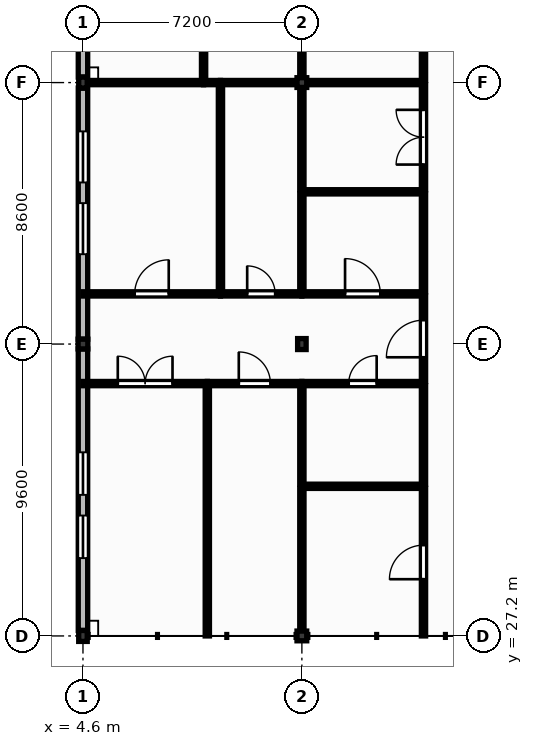
"""IFC4 building model, lengths in metres.
Left out: names, types, materials, properties, quantities, classifications, styles, units other than length and angle.
Written with IfcOpenShell. Run it as: python <this file> out.ifc"""

import sys

from ifc_helpers import new_model, si_unit, direction, frame, frame_2d, origin, origin_2d, place, context, subcontext, project, spatial, rectangle, extrude, element, fill, save


model = new_model("IFC4")
c1 = context("Model", 3, precision=1e-05, world=origin(), true_north=direction((0.0, 1.0)))
c2 = subcontext(c1, "Body", "Model", "MODEL_VIEW")
j1 = project(units=[si_unit("LENGTHUNIT", "METRE"), si_unit("PLANEANGLEUNIT", "RADIAN")], contexts=[c1])
p1 = place(None, origin())
s1 = spatial("IfcSite", under=j1, at=p1, CompositionType="ELEMENT")
p2 = place(p1, origin())
s2 = spatial("IfcBuilding", under=s1, at=p2, CompositionType="ELEMENT")
p3 = place(p2, frame((0.0, 0.0, 9.0)))
s3 = spatial("IfcBuildingStorey", under=s2, at=p3, CompositionType="ELEMENT", Elevation=9.0)
p4 = place(p3, frame((4.6, 27.2, 0.0), z_axis=(0.0, 0.0, 1.0), x_axis=(1.0, 0.0, 0.0)))
e1 = element("IfcColumn", 1, at=p4, inside=s3, PredefinedType="COLUMN", context=c2, shape_type="SweptSolid", body=[
    extrude(rectangle(XDim=0.28, YDim=0.36, at=origin_2d()), origin(), (0.0, 0.0, 1.0), 3.99),
])
p5 = place(p3, frame((4.6, 36.8, 0.0), z_axis=(0.0, 0.0, 1.0), x_axis=(1.0, 0.0, 0.0)))
e2 = element("IfcColumn", 2, at=p5, inside=s3, PredefinedType="COLUMN", context=c2, shape_type="SweptSolid", body=[
    extrude(rectangle(XDim=0.32, YDim=0.32, at=origin_2d()), origin(), (0.0, 0.0, 1.0), 3.99),
])
p6 = place(p3, frame((4.6, 45.4, 0.0), z_axis=(0.0, 0.0, 1.0), x_axis=(1.0, 0.0, 0.0)))
e3 = element("IfcColumn", 3, at=p6, inside=s3, PredefinedType="COLUMN", context=c2, shape_type="SweptSolid", body=[
    extrude(rectangle(XDim=0.28, YDim=0.36, at=origin_2d()), origin(), (0.0, 0.0, 1.0), 3.99),
])
p7 = place(p3, frame((11.8, 27.2, 0.0), z_axis=(0.0, 0.0, 1.0), x_axis=(1.0, 0.0, 0.0)))
e4 = element("IfcColumn", 4, at=p7, inside=s3, PredefinedType="COLUMN", context=c2, shape_type="SweptSolid", body=[
    extrude(rectangle(XDim=0.32, YDim=0.32, at=origin_2d()), origin(), (0.0, 0.0, 1.0), 3.99),
])
p8 = place(p3, frame((11.8, 36.8, 0.0), z_axis=(0.0, 0.0, 1.0), x_axis=(1.0, 0.0, 0.0)))
e5 = element("IfcColumn", 5, at=p8, inside=s3, PredefinedType="COLUMN", context=c2, shape_type="SweptSolid", body=[
    extrude(rectangle(XDim=0.28, YDim=0.36, at=origin_2d()), origin(), (0.0, 0.0, 1.0), 3.99),
])
p9 = place(p3, frame((11.8, 45.4, 0.0), z_axis=(0.0, 0.0, 1.0), x_axis=(1.0, 0.0, 0.0)))
e6 = element("IfcColumn", 6, at=p9, inside=s3, PredefinedType="COLUMN", context=c2, shape_type="SweptSolid", body=[
    extrude(rectangle(XDim=0.32, YDim=0.32, at=origin_2d()), origin(), (0.0, 0.0, 1.0), 3.99),
])
p10 = place(p3, frame((4.6, 27.38, 0.0), z_axis=(0.0, 0.0, 1.0), x_axis=(0.0, 1.0, 0.0)))
e7 = element("IfcWall", 7, at=p10, inside=s3, PredefinedType="SOLIDWALL", context=c2, shape_type="SweptSolid", body=[
    extrude(rectangle(XDim=9.26, YDim=0.31, at=frame_2d((4.63, 0.0))), origin(), (0.0, 0.0, 1.0), 3.53),
])
p11 = place(p10, frame((2.38, 0.0, 1.05)))
e8 = element("IfcOpeningElement", 8, at=p11, cuts=e7, PredefinedType="OPENING", context=c2, shape_type="SweptSolid", body=[
    extrude(rectangle(XDim=1.4, YDim=1.65, at=frame_2d((0.7, 0.825))), frame((0.0, 0.165, 0.0), z_axis=(0.0, -1.0, 0.0), x_axis=(1.0, 0.0, 0.0)), (0.0, 0.0, 1.0), 0.33),
])
p12 = place(p10, frame((4.46, 0.0, 1.05)))
e9 = element("IfcOpeningElement", 9, at=p12, cuts=e7, PredefinedType="OPENING", context=c2, shape_type="SweptSolid", body=[
    extrude(rectangle(XDim=1.4, YDim=1.65, at=frame_2d((0.7, 0.825))), frame((0.0, 0.165, 0.0), z_axis=(0.0, -1.0, 0.0), x_axis=(1.0, 0.0, 0.0)), (0.0, 0.0, 1.0), 0.33),
])
p13 = place(p3, frame((4.6, 36.96, 0.0), z_axis=(0.0, 0.0, 1.0), x_axis=(0.0, 1.0, 0.0)))
e10 = element("IfcWall", 10, at=p13, inside=s3, PredefinedType="SOLIDWALL", context=c2, shape_type="SweptSolid", body=[
    extrude(rectangle(XDim=8.26, YDim=0.31, at=frame_2d((4.13, 0.0))), origin(), (0.0, 0.0, 1.0), 3.53),
])
p14 = place(p13, frame((2.795, 0.0, 1.05)))
e11 = element("IfcOpeningElement", 11, at=p14, cuts=e10, PredefinedType="OPENING", context=c2, shape_type="SweptSolid", body=[
    extrude(rectangle(XDim=1.68, YDim=1.65, at=frame_2d((0.84, 0.825))), frame((0.0, 0.165, 0.0), z_axis=(0.0, -1.0, 0.0), x_axis=(1.0, 0.0, 0.0)), (0.0, 0.0, 1.0), 0.33),
])
p15 = place(p13, frame((5.155, 0.0, 1.05)))
e12 = element("IfcOpeningElement", 12, at=p15, cuts=e10, PredefinedType="OPENING", context=c2, shape_type="SweptSolid", body=[
    extrude(rectangle(XDim=1.68, YDim=1.65, at=frame_2d((0.84, 0.825))), frame((0.0, 0.165, 0.0), z_axis=(0.0, -1.0, 0.0), x_axis=(1.0, 0.0, 0.0)), (0.0, 0.0, 1.0), 0.33),
])
p16 = place(p3, frame((4.6, 45.58, 0.0), z_axis=(0.0, 0.0, 1.0), x_axis=(0.0, 1.0, 0.0)))
e13 = element("IfcWall", 13, at=p16, inside=s3, PredefinedType="SOLIDWALL", context=c2, shape_type="SweptSolid", body=[
    extrude(rectangle(XDim=6.86, YDim=0.31, at=frame_2d((3.43, 0.0))), origin(), (0.0, 0.0, 1.0), 3.53),
])
p17 = place(p16, frame((1.59, 0.0, 1.05)))
e14 = element("IfcOpeningElement", 14, at=p17, cuts=e13, PredefinedType="OPENING", context=c2, shape_type="SweptSolid", body=[
    extrude(rectangle(XDim=1.96, YDim=1.65, at=frame_2d((0.98, 0.825))), frame((0.0, 0.165, 0.0), z_axis=(0.0, -1.0, 0.0), x_axis=(1.0, 0.0, 0.0)), (0.0, 0.0, 1.0), 0.33),
])
p18 = place(p3, frame((4.6, 35.5, 0.0), z_axis=(0.0, 0.0, 1.0), x_axis=(1.0, 0.0, 0.0)))
e15 = element("IfcWall", 15, at=p18, inside=s3, PredefinedType="PARTITIONING", context=c2, shape_type="SweptSolid", body=[
    extrude(rectangle(XDim=4.09, YDim=0.14, at=frame_2d((2.045, 0.0))), origin(), (0.0, 0.0, 1.0), 3.96),
])
p19 = place(p18, frame((1.145, 0.0, 0.0)))
e16 = element("IfcOpeningElement", 16, at=p19, cuts=e15, PredefinedType="OPENING", context=c2, shape_type="SweptSolid", body=[
    extrude(rectangle(XDim=1.8, YDim=2.3, at=frame_2d((0.9, 1.15))), frame((0.0, 0.08, 0.0), z_axis=(0.0, -1.0, 0.0), x_axis=(1.0, 0.0, 0.0)), (0.0, 0.0, 1.0), 0.16),
])
p20 = place(p3, frame((4.6, 38.45, 0.0), z_axis=(0.0, 0.0, 1.0), x_axis=(1.0, 0.0, 0.0)))
e17 = element("IfcWall", 17, at=p20, inside=s3, PredefinedType="PARTITIONING", context=c2, shape_type="SweptSolid", body=[
    extrude(rectangle(XDim=4.522, YDim=0.14, at=frame_2d((2.261, 0.0))), origin(), (0.0, 0.0, 1.0), 3.96),
])
p21 = place(p20, frame((1.701, 0.0, 0.0)))
e18 = element("IfcOpeningElement", 18, at=p21, cuts=e17, PredefinedType="OPENING", context=c2, shape_type="SweptSolid", body=[
    extrude(rectangle(XDim=1.12, YDim=2.15, at=frame_2d((0.56, 1.075))), frame((0.0, 0.08, 0.0), z_axis=(0.0, -1.0, 0.0), x_axis=(1.0, 0.0, 0.0)), (0.0, 0.0, 1.0), 0.16),
])
p22 = place(p3, frame((4.74, 45.4, 0.0), z_axis=(0.0, 0.0, 1.0), x_axis=(1.0, 0.0, 0.0)))
e19 = element("IfcWall", 19, at=p22, inside=s3, PredefinedType="PARTITIONING", context=c2, shape_type="SweptSolid", body=[
    extrude(rectangle(XDim=3.827, YDim=0.14, at=frame_2d((1.914, 0.0))), origin(), (0.0, 0.0, 1.0), 3.39),
])
p23 = place(p3, frame((8.567, 45.47, 0.0), z_axis=(0.0, 0.0, 1.0), x_axis=(0.0, 1.0, 0.0)))
e20 = element("IfcWall", 20, at=p23, inside=s3, PredefinedType="PARTITIONING", context=c2, shape_type="SweptSolid", body=[
    extrude(rectangle(XDim=5.06, YDim=0.14, at=frame_2d((2.53, 0.0))), origin(), (0.0, 0.0, 1.0), 3.96),
])
p24 = place(p3, frame((8.567, 45.4, 0.0), z_axis=(0.0, 0.0, 1.0), x_axis=(1.0, 0.0, 0.0)))
e21 = element("IfcWall", 21, at=p24, inside=s3, PredefinedType="PARTITIONING", context=c2, shape_type="SweptSolid", body=[
    extrude(rectangle(XDim=0.555, YDim=0.14, at=frame_2d((0.278, 0.0))), origin(), (0.0, 0.0, 1.0), 3.39),
])
p25 = place(p3, frame((8.69, 27.2, 0.0), z_axis=(0.0, 0.0, 1.0), x_axis=(0.0, 1.0, 0.0)))
e22 = element("IfcWall", 22, at=p25, inside=s3, PredefinedType="PARTITIONING", context=c2, shape_type="SweptSolid", body=[
    extrude(rectangle(XDim=8.23, YDim=0.14, at=frame_2d((4.115, 0.0))), origin(), (0.0, 0.0, 1.0), 3.96),
])
p26 = place(p3, frame((8.69, 35.5, 0.0), z_axis=(0.0, 0.0, 1.0), x_axis=(1.0, 0.0, 0.0)))
e23 = element("IfcWall", 23, at=p26, inside=s3, PredefinedType="PARTITIONING", context=c2, shape_type="SweptSolid", body=[
    extrude(rectangle(XDim=3.11, YDim=0.14, at=frame_2d((1.555, 0.0))), origin(), (0.0, 0.0, 1.0), 3.96),
])
p27 = place(p26, frame((1.035, 0.0, 0.0)))
e24 = element("IfcOpeningElement", 24, at=p27, cuts=e23, PredefinedType="OPENING", context=c2, shape_type="SweptSolid", body=[
    extrude(rectangle(XDim=1.04, YDim=2.1, at=frame_2d((0.52, 1.05))), frame((0.0, 0.08, 0.0), z_axis=(0.0, -1.0, 0.0), x_axis=(1.0, 0.0, 0.0)), (0.0, 0.0, 1.0), 0.16),
])
p28 = place(p3, frame((9.122, 38.52, 0.0), z_axis=(0.0, 0.0, 1.0), x_axis=(0.0, 1.0, 0.0)))
e25 = element("IfcWall", 25, at=p28, inside=s3, PredefinedType="PARTITIONING", context=c2, shape_type="SweptSolid", body=[
    extrude(rectangle(XDim=6.81, YDim=0.14, at=frame_2d((3.405, 0.0))), origin(), (0.0, 0.0, 1.0), 3.96),
])
p29 = place(p3, frame((9.122, 38.45, 0.0), z_axis=(0.0, 0.0, 1.0), x_axis=(1.0, 0.0, 0.0)))
e26 = element("IfcWall", 26, at=p29, inside=s3, PredefinedType="PARTITIONING", context=c2, shape_type="SweptSolid", body=[
    extrude(rectangle(XDim=2.678, YDim=0.14, at=frame_2d((1.339, 0.0))), origin(), (0.0, 0.0, 1.0), 3.96),
])
p30 = place(p29, frame((0.879, 0.0, 0.0)))
e27 = element("IfcOpeningElement", 27, at=p30, cuts=e26, PredefinedType="OPENING", context=c2, shape_type="SweptSolid", body=[
    extrude(rectangle(XDim=0.92, YDim=2.1, at=frame_2d((0.46, 1.05))), frame((0.0, 0.08, 0.0), z_axis=(0.0, -1.0, 0.0), x_axis=(1.0, 0.0, 0.0)), (0.0, 0.0, 1.0), 0.16),
])
p31 = place(p3, frame((9.122, 45.4, 0.0), z_axis=(0.0, 0.0, 1.0), x_axis=(1.0, 0.0, 0.0)))
e28 = element("IfcWall", 28, at=p31, inside=s3, PredefinedType="PARTITIONING", context=c2, shape_type="SweptSolid", body=[
    extrude(rectangle(XDim=2.518, YDim=0.14, at=frame_2d((1.259, 0.0))), origin(), (0.0, 0.0, 1.0), 3.39),
])
p32 = place(p3, frame((11.8, 27.36, 0.0), z_axis=(0.0, 0.0, 1.0), x_axis=(0.0, 1.0, 0.0)))
e29 = element("IfcWall", 29, at=p32, inside=s3, PredefinedType="PARTITIONING", context=c2, shape_type="SweptSolid", body=[
    extrude(rectangle(XDim=4.692, YDim=0.14, at=frame_2d((2.346, 0.0))), origin(), (0.0, 0.0, 1.0), 3.35),
])
p33 = place(p3, frame((11.8, 32.192, 0.0), z_axis=(0.0, 0.0, 1.0), x_axis=(0.0, 1.0, 0.0)))
e30 = element("IfcWall", 30, at=p33, inside=s3, PredefinedType="PARTITIONING", context=c2, shape_type="SweptSolid", body=[
    extrude(rectangle(XDim=3.238, YDim=0.14, at=frame_2d((1.619, 0.0))), origin(), (0.0, 0.0, 1.0), 3.35),
])
p34 = place(p3, frame((11.8, 32.122, 0.0), z_axis=(0.0, 0.0, 1.0), x_axis=(1.0, 0.0, 0.0)))
e31 = element("IfcWall", 31, at=p34, inside=s3, PredefinedType="PARTITIONING", context=c2, shape_type="SweptSolid", body=[
    extrude(rectangle(XDim=4.0, YDim=0.14, at=frame_2d((2.0, 0.0))), origin(), (0.0, 0.0, 1.0), 3.96),
])
p35 = place(p3, frame((11.8, 35.5, 0.0), z_axis=(0.0, 0.0, 1.0), x_axis=(1.0, 0.0, 0.0)))
e32 = element("IfcWall", 32, at=p35, inside=s3, PredefinedType="PARTITIONING", context=c2, shape_type="SweptSolid", body=[
    extrude(rectangle(XDim=4.0, YDim=0.14, at=frame_2d((2.0, 0.0))), origin(), (0.0, 0.0, 1.0), 3.96),
])
p36 = place(p35, frame((1.54, 0.0, 0.0)))
e33 = element("IfcOpeningElement", 33, at=p36, cuts=e32, PredefinedType="OPENING", context=c2, shape_type="SweptSolid", body=[
    extrude(rectangle(XDim=0.92, YDim=2.1, at=frame_2d((0.46, 1.05))), frame((0.0, 0.08, 0.0), z_axis=(0.0, -1.0, 0.0), x_axis=(1.0, 0.0, 0.0)), (0.0, 0.0, 1.0), 0.16),
])
p37 = place(p3, frame((11.8, 38.52, 0.0), z_axis=(0.0, 0.0, 1.0), x_axis=(0.0, 1.0, 0.0)))
e34 = element("IfcWall", 34, at=p37, inside=s3, PredefinedType="PARTITIONING", context=c2, shape_type="SweptSolid", body=[
    extrude(rectangle(XDim=3.217, YDim=0.14, at=frame_2d((1.608, 0.0))), origin(), (0.0, 0.0, 1.0), 3.35),
])
p38 = place(p3, frame((11.8, 38.45, 0.0), z_axis=(0.0, 0.0, 1.0), x_axis=(1.0, 0.0, 0.0)))
e35 = element("IfcWall", 35, at=p38, inside=s3, PredefinedType="PARTITIONING", context=c2, shape_type="SweptSolid", body=[
    extrude(rectangle(XDim=4.0, YDim=0.14, at=frame_2d((2.0, 0.0))), origin(), (0.0, 0.0, 1.0), 3.96),
])
p39 = place(p38, frame((1.42, 0.0, 0.0)))
e36 = element("IfcOpeningElement", 36, at=p39, cuts=e35, PredefinedType="OPENING", context=c2, shape_type="SweptSolid", body=[
    extrude(rectangle(XDim=1.16, YDim=2.1, at=frame_2d((0.58, 1.05))), frame((0.0, 0.08, 0.0), z_axis=(0.0, -1.0, 0.0), x_axis=(1.0, 0.0, 0.0)), (0.0, 0.0, 1.0), 0.16),
])
p40 = place(p3, frame((11.8, 41.877, 0.0), z_axis=(0.0, 0.0, 1.0), x_axis=(0.0, 1.0, 0.0)))
e37 = element("IfcWall", 37, at=p40, inside=s3, PredefinedType="PARTITIONING", context=c2, shape_type="SweptSolid", body=[
    extrude(rectangle(XDim=3.363, YDim=0.14, at=frame_2d((1.682, 0.0))), origin(), (0.0, 0.0, 1.0), 3.35),
])
p41 = place(p3, frame((11.8, 41.807, 0.0), z_axis=(0.0, 0.0, 1.0), x_axis=(1.0, 0.0, 0.0)))
e38 = element("IfcWall", 38, at=p41, inside=s3, PredefinedType="PARTITIONING", context=c2, shape_type="SweptSolid", body=[
    extrude(rectangle(XDim=4.0, YDim=0.14, at=frame_2d((2.0, 0.0))), origin(), (0.0, 0.0, 1.0), 3.96),
])
p42 = place(p3, frame((11.8, 45.56, 0.0), z_axis=(0.0, 0.0, 1.0), x_axis=(0.0, 1.0, 0.0)))
e39 = element("IfcWall", 39, at=p42, inside=s3, PredefinedType="PARTITIONING", context=c2, shape_type="SweptSolid", body=[
    extrude(rectangle(XDim=4.97, YDim=0.14, at=frame_2d((2.485, 0.0))), origin(), (0.0, 0.0, 1.0), 3.47),
])
p43 = place(p3, frame((11.96, 45.4, 0.0), z_axis=(0.0, 0.0, 1.0), x_axis=(1.0, 0.0, 0.0)))
e40 = element("IfcWall", 40, at=p43, inside=s3, PredefinedType="PARTITIONING", context=c2, shape_type="SweptSolid", body=[
    extrude(rectangle(XDim=3.84, YDim=0.14, at=frame_2d((1.92, 0.0))), origin(), (0.0, 0.0, 1.0), 3.31),
])
p44 = place(p3, frame((15.8, 27.2, 0.0), z_axis=(0.0, 0.0, 1.0), x_axis=(0.0, 1.0, 0.0)))
e41 = element("IfcWall", 41, at=p44, inside=s3, PredefinedType="PARTITIONING", context=c2, shape_type="SweptSolid", body=[
    extrude(rectangle(XDim=4.852, YDim=0.14, at=frame_2d((2.426, 0.0))), origin(), (0.0, 0.0, 1.0), 3.96),
])
p45 = place(p44, frame((1.866, 0.0, 0.0)))
e42 = element("IfcOpeningElement", 42, at=p45, cuts=e41, PredefinedType="OPENING", context=c2, shape_type="SweptSolid", body=[
    extrude(rectangle(XDim=1.12, YDim=2.15, at=frame_2d((0.56, 1.075))), frame((0.0, 0.08, 0.0), z_axis=(0.0, -1.0, 0.0), x_axis=(1.0, 0.0, 0.0)), (0.0, 0.0, 1.0), 0.16),
])
p46 = place(p3, frame((15.8, 32.192, 0.0), z_axis=(0.0, 0.0, 1.0), x_axis=(0.0, 1.0, 0.0)))
e43 = element("IfcWall", 43, at=p46, inside=s3, PredefinedType="PARTITIONING", context=c2, shape_type="SweptSolid", body=[
    extrude(rectangle(XDim=3.238, YDim=0.14, at=frame_2d((1.619, 0.0))), origin(), (0.0, 0.0, 1.0), 3.96),
])
p47 = place(p3, frame((15.8, 35.57, 0.0), z_axis=(0.0, 0.0, 1.0), x_axis=(0.0, 1.0, 0.0)))
e44 = element("IfcWall", 44, at=p47, inside=s3, PredefinedType="PARTITIONING", context=c2, shape_type="SweptSolid", body=[
    extrude(rectangle(XDim=2.81, YDim=0.14, at=frame_2d((1.405, 0.0))), origin(), (0.0, 0.0, 1.0), 3.96),
])
p48 = place(p47, frame((0.795, 0.0, 0.0)))
e45 = element("IfcOpeningElement", 45, at=p48, cuts=e44, PredefinedType="OPENING", context=c2, shape_type="SweptSolid", body=[
    extrude(rectangle(XDim=1.22, YDim=2.1, at=frame_2d((0.61, 1.05))), frame((0.0, 0.08, 0.0), z_axis=(0.0, -1.0, 0.0), x_axis=(1.0, 0.0, 0.0)), (0.0, 0.0, 1.0), 0.16),
])
p49 = place(p3, frame((15.8, 38.52, 0.0), z_axis=(0.0, 0.0, 1.0), x_axis=(0.0, 1.0, 0.0)))
e46 = element("IfcWall", 46, at=p49, inside=s3, PredefinedType="PARTITIONING", context=c2, shape_type="SweptSolid", body=[
    extrude(rectangle(XDim=3.217, YDim=0.14, at=frame_2d((1.608, 0.0))), origin(), (0.0, 0.0, 1.0), 3.96),
])
p50 = place(p3, frame((15.8, 41.877, 0.0), z_axis=(0.0, 0.0, 1.0), x_axis=(0.0, 1.0, 0.0)))
e47 = element("IfcWall", 47, at=p50, inside=s3, PredefinedType="PARTITIONING", context=c2, shape_type="SweptSolid", body=[
    extrude(rectangle(XDim=3.453, YDim=0.14, at=frame_2d((1.727, 0.0))), origin(), (0.0, 0.0, 1.0), 3.96),
])
p51 = place(p50, frame((0.826, 0.0, 0.0)))
e48 = element("IfcOpeningElement", 48, at=p51, cuts=e47, PredefinedType="OPENING", context=c2, shape_type="SweptSolid", body=[
    extrude(rectangle(XDim=1.8, YDim=2.3, at=frame_2d((0.9, 1.15))), frame((0.0, 0.08, 0.0), z_axis=(0.0, -1.0, 0.0), x_axis=(1.0, 0.0, 0.0)), (0.0, 0.0, 1.0), 0.16),
])
p52 = place(p3, frame((15.8, 45.47, 0.0), z_axis=(0.0, 0.0, 1.0), x_axis=(0.0, 1.0, 0.0)))
e49 = element("IfcWall", 49, at=p52, inside=s3, PredefinedType="PARTITIONING", context=c2, shape_type="SweptSolid", body=[
    extrude(rectangle(XDim=5.06, YDim=0.14, at=frame_2d((2.53, 0.0))), origin(), (0.0, 0.0, 1.0), 3.96),
])
p53 = place(p11, origin())
e50 = element("IfcWindow", 50, at=p53, inside=s3, PartitioningType="SINGLE_PANEL", PredefinedType="WINDOW", context=c2, shape_type="SweptSolid", body=[
    extrude(rectangle(XDim=1.4, YDim=1.65, at=frame_2d((0.7, 0.825))), frame((0.0, 0.03, 0.0), z_axis=(0.0, -1.0, 0.0), x_axis=(1.0, 0.0, 0.0)), (0.0, 0.0, 1.0), 0.06),
])
fill(e8, e50)
p54 = place(p12, origin())
e51 = element("IfcWindow", 51, at=p54, inside=s3, PartitioningType="SINGLE_PANEL", PredefinedType="WINDOW", context=c2, shape_type="SweptSolid", body=[
    extrude(rectangle(XDim=1.4, YDim=1.65, at=frame_2d((0.7, 0.825))), frame((0.0, 0.03, 0.0), z_axis=(0.0, -1.0, 0.0), x_axis=(1.0, 0.0, 0.0)), (0.0, 0.0, 1.0), 0.06),
])
fill(e9, e51)
p55 = place(p14, origin())
e52 = element("IfcWindow", 52, at=p55, inside=s3, PartitioningType="DOUBLE_PANEL_VERTICAL", PredefinedType="WINDOW", context=c2, shape_type="SweptSolid", body=[
    extrude(rectangle(XDim=1.68, YDim=1.65, at=frame_2d((0.84, 0.825))), frame((0.0, 0.03, 0.0), z_axis=(0.0, -1.0, 0.0), x_axis=(1.0, 0.0, 0.0)), (0.0, 0.0, 1.0), 0.06),
])
fill(e11, e52)
p56 = place(p15, origin())
e53 = element("IfcWindow", 53, at=p56, inside=s3, PartitioningType="DOUBLE_PANEL_VERTICAL", PredefinedType="WINDOW", context=c2, shape_type="SweptSolid", body=[
    extrude(rectangle(XDim=1.68, YDim=1.65, at=frame_2d((0.84, 0.825))), frame((0.0, 0.03, 0.0), z_axis=(0.0, -1.0, 0.0), x_axis=(1.0, 0.0, 0.0)), (0.0, 0.0, 1.0), 0.06),
])
fill(e12, e53)
p57 = place(p48, origin())
e54 = element("IfcDoor", 54, at=p57, inside=s3, OperationType="SINGLE_SWING_LEFT", PredefinedType="DOOR", context=c2, shape_type="SweptSolid", body=[
    extrude(rectangle(XDim=1.22, YDim=2.1, at=frame_2d((0.61, 1.05))), frame((0.0, 0.025, 0.0), z_axis=(0.0, -1.0, 0.0), x_axis=(1.0, 0.0, 0.0)), (0.0, 0.0, 1.0), 0.05),
])
fill(e45, e54)
p58 = place(p19, origin())
e55 = element("IfcDoor", 55, at=p58, inside=s3, OperationType="DOUBLE_DOOR_SINGLE_SWING", PredefinedType="DOOR", context=c2, shape_type="SweptSolid", body=[
    extrude(rectangle(XDim=1.8, YDim=2.3, at=frame_2d((0.9, 1.15))), frame((0.0, 0.025, 0.0), z_axis=(0.0, -1.0, 0.0), x_axis=(1.0, 0.0, 0.0)), (0.0, 0.0, 1.0), 0.05),
])
fill(e16, e55)
p59 = place(p27, origin())
e56 = element("IfcDoor", 56, at=p59, inside=s3, OperationType="SINGLE_SWING_LEFT", PredefinedType="DOOR", context=c2, shape_type="SweptSolid", body=[
    extrude(rectangle(XDim=1.04, YDim=2.1, at=frame_2d((0.52, 1.05))), frame((0.0, 0.025, 0.0), z_axis=(0.0, -1.0, 0.0), x_axis=(1.0, 0.0, 0.0)), (0.0, 0.0, 1.0), 0.05),
])
fill(e24, e56)
p60 = place(p21, origin())
e57 = element("IfcDoor", 57, at=p60, inside=s3, OperationType="SINGLE_SWING_RIGHT", PredefinedType="DOOR", context=c2, shape_type="SweptSolid", body=[
    extrude(rectangle(XDim=1.12, YDim=2.15, at=frame_2d((0.56, 1.075))), frame((0.0, 0.025, 0.0), z_axis=(0.0, -1.0, 0.0), x_axis=(1.0, 0.0, 0.0)), (0.0, 0.0, 1.0), 0.05),
])
fill(e18, e57)
p61 = place(p30, origin())
e58 = element("IfcDoor", 58, at=p61, inside=s3, OperationType="SINGLE_SWING_LEFT", PredefinedType="DOOR", context=c2, shape_type="SweptSolid", body=[
    extrude(rectangle(XDim=0.92, YDim=2.1, at=frame_2d((0.46, 1.05))), frame((0.0, 0.025, 0.0), z_axis=(0.0, -1.0, 0.0), x_axis=(1.0, 0.0, 0.0)), (0.0, 0.0, 1.0), 0.05),
])
fill(e27, e58)
p62 = place(p45, origin())
e59 = element("IfcDoor", 59, at=p62, inside=s3, OperationType="SINGLE_SWING_LEFT", PredefinedType="DOOR", context=c2, shape_type="SweptSolid", body=[
    extrude(rectangle(XDim=1.12, YDim=2.15, at=frame_2d((0.56, 1.075))), frame((0.0, 0.025, 0.0), z_axis=(0.0, -1.0, 0.0), x_axis=(1.0, 0.0, 0.0)), (0.0, 0.0, 1.0), 0.05),
])
fill(e42, e59)
p63 = place(p36, origin())
e60 = element("IfcDoor", 60, at=p63, inside=s3, OperationType="SINGLE_SWING_RIGHT", PredefinedType="DOOR", context=c2, shape_type="SweptSolid", body=[
    extrude(rectangle(XDim=0.92, YDim=2.1, at=frame_2d((0.46, 1.05))), frame((0.0, 0.025, 0.0), z_axis=(0.0, -1.0, 0.0), x_axis=(1.0, 0.0, 0.0)), (0.0, 0.0, 1.0), 0.05),
])
fill(e33, e60)
p64 = place(p39, origin())
e61 = element("IfcDoor", 61, at=p64, inside=s3, OperationType="SINGLE_SWING_LEFT", PredefinedType="DOOR", context=c2, shape_type="SweptSolid", body=[
    extrude(rectangle(XDim=1.16, YDim=2.1, at=frame_2d((0.58, 1.05))), frame((0.0, 0.025, 0.0), z_axis=(0.0, -1.0, 0.0), x_axis=(1.0, 0.0, 0.0)), (0.0, 0.0, 1.0), 0.05),
])
fill(e36, e61)
p65 = place(p51, origin())
e62 = element("IfcDoor", 62, at=p65, inside=s3, OperationType="DOUBLE_DOOR_SINGLE_SWING", PredefinedType="DOOR", context=c2, shape_type="SweptSolid", body=[
    extrude(rectangle(XDim=1.8, YDim=2.3, at=frame_2d((0.9, 1.15))), frame((0.0, 0.025, 0.0), z_axis=(0.0, -1.0, 0.0), x_axis=(1.0, 0.0, 0.0)), (0.0, 0.0, 1.0), 0.05),
])
fill(e48, e62)
save(model, sys.argv[1])
